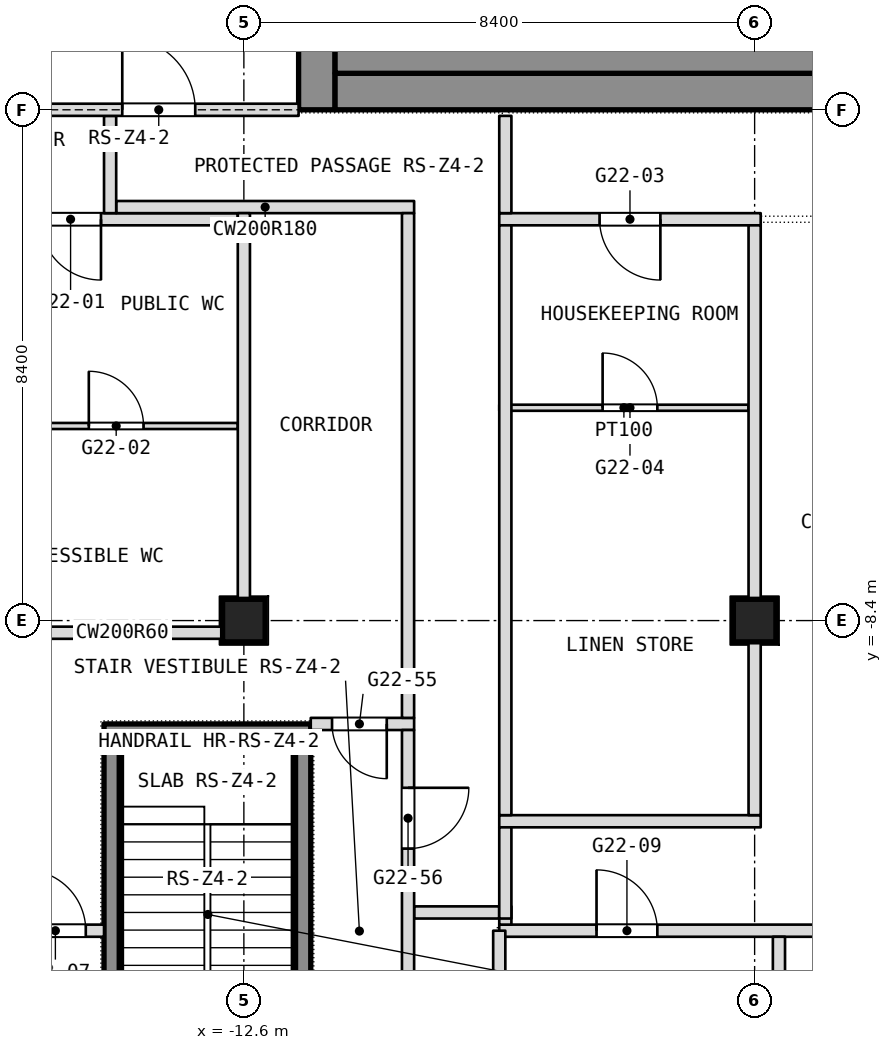
"""IFC4 building model, lengths in metres.
Left out: names, types, materials, properties, quantities, classifications, styles, units other than length and angle.
Written with IfcOpenShell. Run it as: python <this file> out.ifc"""

import sys

from ifc_helpers import new_model, si_unit, direction, frame, frame_2d, origin, origin_2d, place, context, subcontext, project, spatial, rectangle, extrude, element, fill, save


model = new_model("IFC4")
c1 = context("Model", 3, precision=1e-05, world=origin(), true_north=direction((0.0, 1.0)))
c2 = subcontext(c1, "Body", "Model", "MODEL_VIEW")
j1 = project(units=[si_unit("LENGTHUNIT", "METRE"), si_unit("PLANEANGLEUNIT", "RADIAN")], contexts=[c1])
p1 = place(None, origin())
s1 = spatial("IfcSite", under=j1, at=p1, CompositionType="ELEMENT")
p2 = place(p1, origin())
s2 = spatial("IfcBuilding", under=s1, at=p2, CompositionType="ELEMENT")
p3 = place(p2, frame((0.0, 0.0, 266.9)))
s3 = spatial("IfcBuildingStorey", under=s2, at=p3, CompositionType="ELEMENT", Elevation=266.9)
p4 = place(p3, frame((-11.4, 0.0, 0.0), z_axis=(0.0, 0.0, 1.0), x_axis=(0.0, 1.0, 0.0)))
e1 = element("IfcWall", 1, at=p4, inside=s3, PredefinedType="SHEAR", context=c2, shape_type="SweptSolid", body=[
    extrude(rectangle(XDim=16.8, YDim=0.6, at=frame_2d((8.4, 0.0))), origin(), (0.0, 0.0, 1.0), 3.6),
])
p5 = place(p4, frame((3.6, 0.0, 0.0)))
e2 = element("IfcOpeningElement", 2, at=p5, cuts=e1, PredefinedType="OPENING", context=c2, shape_type="SweptSolid", body=[
    extrude(rectangle(XDim=0.9, YDim=2.1, at=frame_2d((0.45, 1.05))), frame((0.0, 0.3, 0.0), z_axis=(0.0, -1.0, 0.0), x_axis=(1.0, 0.0, 0.0)), (0.0, 0.0, 1.0), 0.6),
])
p6 = place(p4, frame((6.825, 0.0, 0.0)))
e3 = element("IfcOpeningElement", 3, at=p6, cuts=e1, PredefinedType="OPENING", context=c2, shape_type="SweptSolid", body=[
    extrude(rectangle(XDim=1.2, YDim=2.1, at=frame_2d((0.6, 1.05))), frame((0.0, 0.3, 0.0), z_axis=(0.0, -1.0, 0.0), x_axis=(1.0, 0.0, 0.0)), (0.0, 0.0, 1.0), 0.6),
])
p7 = place(p4, frame((12.3, 0.0, 0.0)))
e4 = element("IfcOpeningElement", 4, at=p7, cuts=e1, PredefinedType="OPENING", context=c2, shape_type="SweptSolid", body=[
    extrude(rectangle(XDim=0.9, YDim=2.1, at=frame_2d((0.45, 1.05))), frame((0.0, 0.3, 0.0), z_axis=(0.0, -1.0, 0.0), x_axis=(1.0, 0.0, 0.0)), (0.0, 0.0, 1.0), 0.6),
])
p8 = place(p4, frame((8.775, 0.0, 0.0)))
e5 = element("IfcOpeningElement", 5, at=p8, cuts=e1, PredefinedType="OPENING", context=c2, shape_type="SweptSolid", body=[
    extrude(rectangle(XDim=1.2, YDim=2.1, at=frame_2d((0.6, 1.05))), frame((0.0, 0.3, 0.0), z_axis=(0.0, -1.0, 0.0), x_axis=(1.0, 0.0, 0.0)), (0.0, 0.0, 1.0), 0.6),
])
p9 = place(p3, frame((-11.1, 0.3, 0.0), z_axis=(0.0, 0.0, 1.0), x_axis=(1.0, 0.0, 0.0)))
e6 = element("IfcWall", 6, at=p9, inside=s3, PredefinedType="SHEAR", context=c2, shape_type="SweptSolid", body=[
    extrude(rectangle(XDim=22.2, YDim=0.6, at=frame_2d((11.1, 0.0))), origin(), (0.0, 0.0, 1.0), 3.6),
])
p10 = place(p3, frame((-4.2, 0.6, 0.0), z_axis=(0.0, 0.0, 1.0), x_axis=(0.0, 1.0, 0.0)))
e7 = element("IfcWall", 7, at=p10, inside=s3, PredefinedType="SHEAR", context=c2, shape_type="SweptSolid", body=[
    extrude(rectangle(XDim=15.6, YDim=0.35, at=frame_2d((7.8, 0.0))), origin(), (0.0, 0.0, 1.0), 3.6),
])
p11 = place(p10, frame((8.7, 0.0, 0.0)))
e8 = element("IfcOpeningElement", 8, at=p11, cuts=e7, PredefinedType="OPENING", context=c2, shape_type="SweptSolid", body=[
    extrude(rectangle(XDim=1.2, YDim=2.1, at=frame_2d((0.6, 1.05))), frame((0.0, 0.175, 0.0), z_axis=(0.0, -1.0, 0.0), x_axis=(1.0, 0.0, 0.0)), (0.0, 0.0, 1.0), 0.35),
])
for number, where, z_axis, x_axis in (
    (9, (-12.6, -8.4, 0.0), (0.0, 0.0, 1.0), (1.0, 0.0, 0.0)),
    (10, (-4.2, -8.4, 0.0), (0.0, 0.0, 1.0), (1.0, 0.0, 0.0)),
):
    element("IfcColumn", number, at=place(p3, frame(where, z_axis=z_axis, x_axis=x_axis)), inside=s3, PredefinedType="COLUMN", context=c2, shape_type="SweptSolid", body=[
        extrude(rectangle(XDim=0.7, YDim=0.7, at=origin_2d()), origin(), (0.0, 0.0, 1.0), 3.6),
    ])
p12 = place(p3, frame((-16.7, -13.5, 0.0), z_axis=(0.0, 0.0, 1.0), x_axis=(1.0, 0.0, 0.0)))
e11 = element("IfcWall", 11, at=p12, inside=s3, PredefinedType="PARTITIONING", context=c2, shape_type="SweptSolid", body=[
    extrude(rectangle(XDim=1.8, YDim=0.2, at=frame_2d((0.9, 0.0))), origin(), (0.0, 0.0, 1.0), 3.34),
])
p13 = place(p12, frame((0.5, 0.0, 0.0)))
e12 = element("IfcOpeningElement", 12, at=p13, cuts=e11, PredefinedType="OPENING", context=c2, shape_type="SweptSolid", body=[
    extrude(rectangle(XDim=1.0, YDim=2.1, at=frame_2d((0.5, 1.05))), frame((0.0, 0.1, 0.0), z_axis=(0.0, -1.0, 0.0), x_axis=(1.0, 0.0, 0.0)), (0.0, 0.0, 1.0), 0.2),
])
p14 = place(p3, frame((-8.4, -13.5, 0.0), z_axis=(0.0, 0.0, 1.0), x_axis=(1.0, 0.0, 0.0)))
e13 = element("IfcWall", 13, at=p14, inside=s3, PredefinedType="PARTITIONING", context=c2, shape_type="SweptSolid", body=[
    extrude(rectangle(XDim=12.7, YDim=0.2, at=frame_2d((6.35, 0.0))), origin(), (0.0, 0.0, 1.0), 3.34),
])
p15 = place(p14, frame((1.6, 0.0, 0.0)))
e14 = element("IfcOpeningElement", 14, at=p15, cuts=e13, PredefinedType="OPENING", context=c2, shape_type="SweptSolid", body=[
    extrude(rectangle(XDim=1.0, YDim=2.1, at=frame_2d((0.5, 1.05))), frame((0.0, 0.1, 0.0), z_axis=(0.0, -1.0, 0.0), x_axis=(1.0, 0.0, 0.0)), (0.0, 0.0, 1.0), 0.2),
])
p16 = place(p14, frame((5.8, 0.0, 0.0)))
e15 = element("IfcOpeningElement", 15, at=p16, cuts=e13, PredefinedType="OPENING", context=c2, shape_type="SweptSolid", body=[
    extrude(rectangle(XDim=1.0, YDim=2.1, at=frame_2d((0.5, 1.05))), frame((0.0, 0.1, 0.0), z_axis=(0.0, -1.0, 0.0), x_axis=(1.0, 0.0, 0.0)), (0.0, 0.0, 1.0), 0.2),
])
p17 = place(p14, frame((10.0, 0.0, 0.0)))
e16 = element("IfcOpeningElement", 16, at=p17, cuts=e13, PredefinedType="OPENING", context=c2, shape_type="SweptSolid", body=[
    extrude(rectangle(XDim=1.0, YDim=2.1, at=frame_2d((0.5, 1.05))), frame((0.0, 0.1, 0.0), z_axis=(0.0, -1.0, 0.0), x_axis=(1.0, 0.0, 0.0)), (0.0, 0.0, 1.0), 0.2),
])
p18 = place(p3, frame((-9.8, -13.2, 0.0), z_axis=(0.0, 0.0, 1.0), x_axis=(1.0, 0.0, 0.0)))
e17 = element("IfcWall", 17, at=p18, inside=s3, PredefinedType="PARTITIONING", context=c2, shape_type="SweptSolid", body=[
    extrude(rectangle(XDim=1.4, YDim=0.2, at=frame_2d((0.7, 0.0))), origin(), (0.0, 0.0, 1.0), 3.34),
])
p19 = place(p3, frame((-8.4, -11.7, 0.0), z_axis=(0.0, 0.0, 1.0), x_axis=(1.0, 0.0, 0.0)))
e18 = element("IfcWall", 18, at=p19, inside=s3, PredefinedType="PARTITIONING", context=c2, shape_type="SweptSolid", body=[
    extrude(rectangle(XDim=4.3, YDim=0.2, at=frame_2d((2.15, 0.0))), origin(), (0.0, 0.0, 1.0), 3.34),
])
p20 = place(p3, frame((-11.5, -10.1, 0.0), z_axis=(0.0, 0.0, 1.0), x_axis=(1.0, 0.0, 0.0)))
e19 = element("IfcWall", 19, at=p20, inside=s3, PredefinedType="PARTITIONING", context=c2, shape_type="SweptSolid", body=[
    extrude(rectangle(XDim=1.7, YDim=0.2, at=frame_2d((0.85, 0.0))), origin(), (0.0, 0.0, 1.0), 3.34),
])
p21 = place(p20, frame((0.35, 0.0, 0.0)))
e20 = element("IfcOpeningElement", 20, at=p21, cuts=e19, PredefinedType="OPENING", context=c2, shape_type="SweptSolid", body=[
    extrude(rectangle(XDim=0.9, YDim=2.1, at=frame_2d((0.45, 1.05))), frame((0.0, 0.1, 0.0), z_axis=(0.0, -1.0, 0.0), x_axis=(1.0, 0.0, 0.0)), (0.0, 0.0, 1.0), 0.2),
])
p22 = place(p3, frame((-16.7, -8.6, 0.0), z_axis=(0.0, 0.0, 1.0), x_axis=(1.0, 0.0, 0.0)))
e21 = element("IfcWall", 21, at=p22, inside=s3, PredefinedType="PARTITIONING", context=c2, shape_type="SweptSolid", body=[
    extrude(rectangle(XDim=4.2, YDim=0.2, at=frame_2d((2.1, 0.0))), origin(), (0.0, 0.0, 1.0), 3.34),
])
p23 = place(p3, frame((-16.7, -5.2, 0.0), z_axis=(0.0, 0.0, 1.0), x_axis=(1.0, 0.0, 0.0)))
e22 = element("IfcWall", 22, at=p23, inside=s3, PredefinedType="PARTITIONING", context=c2, shape_type="SweptSolid", body=[
    extrude(rectangle(XDim=4.0, YDim=0.1, at=frame_2d((2.0, 0.0))), origin(), (0.0, 0.0, 1.0), 3.34),
])
p24 = place(p23, frame((1.55, 0.0, 0.0)))
e23 = element("IfcOpeningElement", 23, at=p24, cuts=e22, PredefinedType="OPENING", context=c2, shape_type="SweptSolid", body=[
    extrude(rectangle(XDim=0.9, YDim=2.1, at=frame_2d((0.45, 1.05))), frame((0.0, 0.05, 0.0), z_axis=(0.0, -1.0, 0.0), x_axis=(1.0, 0.0, 0.0)), (0.0, 0.0, 1.0), 0.1),
])
p25 = place(p3, frame((-8.4, -4.9, 0.0), z_axis=(0.0, 0.0, 1.0), x_axis=(1.0, 0.0, 0.0)))
e24 = element("IfcWall", 24, at=p25, inside=s3, PredefinedType="PARTITIONING", context=c2, shape_type="SweptSolid", body=[
    extrude(rectangle(XDim=4.1, YDim=0.1, at=frame_2d((2.05, 0.0))), origin(), (0.0, 0.0, 1.0), 3.34),
])
p26 = place(p25, frame((1.7, 0.0, 0.0)))
e25 = element("IfcOpeningElement", 25, at=p26, cuts=e24, PredefinedType="OPENING", context=c2, shape_type="SweptSolid", body=[
    extrude(rectangle(XDim=0.9, YDim=2.1, at=frame_2d((0.45, 1.05))), frame((0.0, 0.05, 0.0), z_axis=(0.0, -1.0, 0.0), x_axis=(1.0, 0.0, 0.0)), (0.0, 0.0, 1.0), 0.1),
])
p27 = place(p3, frame((-16.9, -1.8, 0.0), z_axis=(0.0, 0.0, 1.0), x_axis=(1.0, 0.0, 0.0)))
e26 = element("IfcWall", 26, at=p27, inside=s3, PredefinedType="PARTITIONING", context=c2, shape_type="SweptSolid", body=[
    extrude(rectangle(XDim=4.2, YDim=0.2, at=frame_2d((2.1, 0.0))), origin(), (0.0, 0.0, 1.0), 3.34),
])
p28 = place(p27, frame((0.95, 0.0, 0.0)))
e27 = element("IfcOpeningElement", 27, at=p28, cuts=e26, PredefinedType="OPENING", context=c2, shape_type="SweptSolid", body=[
    extrude(rectangle(XDim=1.0, YDim=2.1, at=frame_2d((0.5, 1.05))), frame((0.0, 0.1, 0.0), z_axis=(0.0, -1.0, 0.0), x_axis=(1.0, 0.0, 0.0)), (0.0, 0.0, 1.0), 0.2),
])
p29 = place(p3, frame((-8.4, -1.8, 0.0), z_axis=(0.0, 0.0, 1.0), x_axis=(1.0, 0.0, 0.0)))
e28 = element("IfcWall", 28, at=p29, inside=s3, PredefinedType="PARTITIONING", context=c2, shape_type="SweptSolid", body=[
    extrude(rectangle(XDim=4.3, YDim=0.2, at=frame_2d((2.15, 0.0))), origin(), (0.0, 0.0, 1.0), 3.34),
])
p30 = place(p29, frame((1.65, 0.0, 0.0)))
e29 = element("IfcOpeningElement", 29, at=p30, cuts=e28, PredefinedType="OPENING", context=c2, shape_type="SweptSolid", body=[
    extrude(rectangle(XDim=1.0, YDim=2.1, at=frame_2d((0.5, 1.05))), frame((0.0, 0.1, 0.0), z_axis=(0.0, -1.0, 0.0), x_axis=(1.0, 0.0, 0.0)), (0.0, 0.0, 1.0), 0.2),
])
p31 = place(p3, frame((-14.7, -1.6, 0.0), z_axis=(0.0, 0.0, 1.0), x_axis=(1.0, 0.0, 0.0)))
e30 = element("IfcWall", 30, at=p31, inside=s3, PredefinedType="PARTITIONING", context=c2, shape_type="SweptSolid", body=[
    extrude(rectangle(XDim=4.9, YDim=0.2, at=frame_2d((2.45, 0.0))), origin(), (0.0, 0.0, 1.0), 3.34),
])
p32 = place(p3, frame((-3.8, -20.0, 0.0), z_axis=(0.0, 0.0, 1.0), x_axis=(0.0, 1.0, 0.0)))
e31 = element("IfcWall", 31, at=p32, inside=s3, PredefinedType="PARTITIONING", context=c2, shape_type="SweptSolid", body=[
    extrude(rectangle(XDim=6.4, YDim=0.2, at=frame_2d((3.2, 0.0))), origin(), (0.0, 0.0, 1.0), 3.34),
])
p33 = place(p3, frame((-4.2, -11.6, 0.0), z_axis=(0.0, 0.0, 1.0), x_axis=(0.0, 1.0, 0.0)))
e32 = element("IfcWall", 32, at=p33, inside=s3, PredefinedType="PARTITIONING", context=c2, shape_type="SweptSolid", body=[
    extrude(rectangle(XDim=9.7, YDim=0.2, at=frame_2d((4.85, 0.0))), origin(), (0.0, 0.0, 1.0), 3.34),
])
p34 = place(p3, frame((-8.3, -13.4, 0.0), z_axis=(0.0, 0.0, 1.0), x_axis=(0.0, 1.0, 0.0)))
e33 = element("IfcWall", 33, at=p34, inside=s3, PredefinedType="PARTITIONING", context=c2, shape_type="SweptSolid", body=[
    extrude(rectangle(XDim=0.3, YDim=0.2, at=frame_2d((0.15, 0.0))), origin(), (0.0, 0.0, 1.0), 3.34),
])
p35 = place(p3, frame((-8.3, -13.3, 0.0), z_axis=(0.0, 0.0, 1.0), x_axis=(0.0, 1.0, 0.0)))
e34 = element("IfcWall", 34, at=p35, inside=s3, PredefinedType="PARTITIONING", context=c2, shape_type="SweptSolid", body=[
    extrude(rectangle(XDim=1.5, YDim=0.2, at=frame_2d((0.75, 0.0))), origin(), (0.0, 0.0, 1.0), 3.34),
])
p36 = place(p3, frame((-8.3, -1.7, 0.0), z_axis=(0.0, 0.0, 1.0), x_axis=(0.0, 1.0, 0.0)))
e35 = element("IfcWall", 35, at=p36, inside=s3, PredefinedType="PARTITIONING", context=c2, shape_type="SweptSolid", body=[
    extrude(rectangle(XDim=1.6, YDim=0.2, at=frame_2d((0.8, 0.0))), origin(), (0.0, 0.0, 1.0), 3.34),
])
p37 = place(p3, frame((-8.3, -11.6, 0.0), z_axis=(0.0, 0.0, 1.0), x_axis=(0.0, 1.0, 0.0)))
e36 = element("IfcWall", 36, at=p37, inside=s3, PredefinedType="PARTITIONING", context=c2, shape_type="SweptSolid", body=[
    extrude(rectangle(XDim=9.7, YDim=0.2, at=frame_2d((4.85, 0.0))), origin(), (0.0, 0.0, 1.0), 3.34),
])
p38 = place(p3, frame((-8.4, -20.0, 0.0), z_axis=(0.0, 0.0, 1.0), x_axis=(0.0, 1.0, 0.0)))
e37 = element("IfcWall", 37, at=p38, inside=s3, PredefinedType="PARTITIONING", context=c2, shape_type="SweptSolid", body=[
    extrude(rectangle(XDim=6.5, YDim=0.2, at=frame_2d((3.25, 0.0))), origin(), (0.0, 0.0, 1.0), 3.34),
])
p39 = place(p3, frame((-9.9, -16.4, 0.0), z_axis=(0.0, 0.0, 1.0), x_axis=(0.0, 1.0, 0.0)))
e38 = element("IfcWall", 38, at=p39, inside=s3, PredefinedType="PARTITIONING", context=c2, shape_type="SweptSolid", body=[
    extrude(rectangle(XDim=6.2, YDim=0.2, at=frame_2d((3.1, 0.0))), origin(), (0.0, 0.0, 1.0), 3.34),
])
p40 = place(p39, frame((4.25, 0.0, 0.0)))
e39 = element("IfcOpeningElement", 39, at=p40, cuts=e38, PredefinedType="OPENING", context=c2, shape_type="SweptSolid", body=[
    extrude(rectangle(XDim=1.0, YDim=2.1, at=frame_2d((0.5, 1.05))), frame((0.0, 0.1, 0.0), z_axis=(0.0, -1.0, 0.0), x_axis=(1.0, 0.0, 0.0)), (0.0, 0.0, 1.0), 0.2),
])
p41 = place(p3, frame((-9.9, -10.0, 0.0), z_axis=(0.0, 0.0, 1.0), x_axis=(0.0, 1.0, 0.0)))
e40 = element("IfcWall", 40, at=p41, inside=s3, PredefinedType="PARTITIONING", context=c2, shape_type="SweptSolid", body=[
    extrude(rectangle(XDim=8.3, YDim=0.2, at=frame_2d((4.15, 0.0))), origin(), (0.0, 0.0, 1.0), 3.34),
])
p42 = place(p3, frame((-12.6, -8.5, 0.0), z_axis=(0.0, 0.0, 1.0), x_axis=(0.0, 1.0, 0.0)))
e41 = element("IfcWall", 41, at=p42, inside=s3, PredefinedType="PARTITIONING", context=c2, shape_type="SweptSolid", body=[
    extrude(rectangle(XDim=6.8, YDim=0.2, at=frame_2d((3.4, 0.0))), origin(), (0.0, 0.0, 1.0), 3.34),
])
p43 = place(p3, frame((-14.8, -1.7, 0.0), z_axis=(0.0, 0.0, 1.0), x_axis=(0.0, 1.0, 0.0)))
e42 = element("IfcWall", 42, at=p43, inside=s3, PredefinedType="PARTITIONING", context=c2, shape_type="SweptSolid", body=[
    extrude(rectangle(XDim=1.6, YDim=0.2, at=frame_2d((0.8, 0.0))), origin(), (0.0, 0.0, 1.0), 3.34),
])
p44 = place(p3, frame((-11.1, 1.05, 0.0), z_axis=(0.0, 0.0, 1.0), x_axis=(1.0, 0.0, 0.0)))
e43 = element("IfcWall", 43, at=p44, inside=s3, PredefinedType="PARTITIONING", context=c2, shape_type="SweptSolid", body=[
    extrude(rectangle(XDim=22.2, YDim=0.9, at=frame_2d((11.1, 0.0))), origin(), (0.0, 0.0, 1.0), 3.34),
])
p45 = place(p3, frame((-16.7, 0.0, 0.0), z_axis=(0.0, 0.0, 1.0), x_axis=(1.0, 0.0, 0.0)))
e44 = element("IfcWall", 44, at=p45, inside=s3, PredefinedType="PARTITIONING", context=c2, shape_type="SweptSolid", body=[
    extrude(rectangle(XDim=5.0, YDim=0.2, at=frame_2d((2.5, 0.0))), origin(), (0.0, 0.0, 1.0), 3.0),
])
p46 = place(p45, frame((2.1, 0.0, 0.0)))
e45 = element("IfcOpeningElement", 45, at=p46, cuts=e44, PredefinedType="OPENING", context=c2, shape_type="SweptSolid", body=[
    extrude(rectangle(XDim=1.2, YDim=2.1, at=frame_2d((0.6, 1.05))), frame((0.0, 0.1, 0.0), z_axis=(0.0, -1.0, 0.0), x_axis=(1.0, 0.0, 0.0)), (0.0, 0.0, 1.0), 0.2),
])
p47 = place(p3, frame((-14.9, -10.225, -0.26), z_axis=(0.0, 0.0, 1.0), x_axis=(1.0, 0.0, 0.0)))
e46 = element("IfcWall", 46, at=p47, inside=s3, PredefinedType="SHEAR", context=c2, shape_type="SweptSolid", body=[
    extrude(rectangle(XDim=3.4, YDim=0.25, at=frame_2d((1.7, 0.0))), origin(), (0.0, 0.0, 1.0), 3.96),
])
p48 = place(p3, frame((-14.775, -16.05, -0.26), z_axis=(0.0, 0.0, 1.0), x_axis=(0.0, 1.0, 0.0)))
e47 = element("IfcWall", 47, at=p48, inside=s3, PredefinedType="SHEAR", context=c2, shape_type="SweptSolid", body=[
    extrude(rectangle(XDim=5.7, YDim=0.25, at=frame_2d((2.85, 0.0))), origin(), (0.0, 0.0, 1.0), 3.96),
])
p49 = place(p3, frame((-11.625, -16.05, -0.26), z_axis=(0.0, 0.0, 1.0), x_axis=(0.0, 1.0, 0.0)))
e48 = element("IfcWall", 48, at=p49, inside=s3, PredefinedType="SHEAR", context=c2, shape_type="SweptSolid", body=[
    extrude(rectangle(XDim=5.7, YDim=0.25, at=frame_2d((2.85, 0.0))), origin(), (0.0, 0.0, 1.0), 3.96),
])
p50 = place(p49, frame((0.2, 0.0, 0.0)))
e49 = element("IfcOpeningElement", 49, at=p50, cuts=e48, PredefinedType="OPENING", context=c2, shape_type="SweptSolid", body=[
    extrude(rectangle(XDim=1.0, YDim=2.1, at=frame_2d((0.5, 1.05))), frame((0.0, 0.125, 0.0), z_axis=(0.0, -1.0, 0.0), x_axis=(1.0, 0.0, 0.0)), (0.0, 0.0, 1.0), 0.25),
])
p51 = place(p13, origin())
e50 = element("IfcDoor", 50, at=p51, inside=s3, OperationType="SINGLE_SWING_RIGHT", PredefinedType="DOOR", context=c2, shape_type="SweptSolid", body=[
    extrude(rectangle(XDim=1.0, YDim=2.1, at=frame_2d((0.5, 1.05))), frame((0.0, 0.025, 0.0), z_axis=(0.0, -1.0, 0.0), x_axis=(1.0, 0.0, 0.0)), (0.0, 0.0, 1.0), 0.05),
])
fill(e12, e50)
p52 = place(p15, origin())
e51 = element("IfcDoor", 51, at=p52, inside=s3, OperationType="SINGLE_SWING_LEFT", PredefinedType="DOOR", context=c2, shape_type="SweptSolid", body=[
    extrude(rectangle(XDim=1.0, YDim=2.1, at=frame_2d((0.5, 1.05))), frame((0.0, 0.025, 0.0), z_axis=(0.0, -1.0, 0.0), x_axis=(1.0, 0.0, 0.0)), (0.0, 0.0, 1.0), 0.05),
])
fill(e14, e51)
p53 = place(p21, origin())
e52 = element("IfcDoor", 52, at=p53, inside=s3, OperationType="SINGLE_SWING_LEFT", PredefinedType="DOOR", context=c2, shape_type="SweptSolid", body=[
    extrude(rectangle(XDim=0.9, YDim=2.1, at=frame_2d((0.45, 1.05))), frame((0.0, 0.025, 0.0), z_axis=(0.0, -1.0, 0.0), x_axis=(1.0, 0.0, 0.0)), (0.0, 0.0, 1.0), 0.05),
])
fill(e20, e52)
p54 = place(p24, origin())
e53 = element("IfcDoor", 53, at=p54, inside=s3, OperationType="SINGLE_SWING_RIGHT", PredefinedType="DOOR", context=c2, shape_type="SweptSolid", body=[
    extrude(rectangle(XDim=0.9, YDim=2.1, at=frame_2d((0.45, 1.05))), frame((0.0, 0.025, 0.0), z_axis=(0.0, -1.0, 0.0), x_axis=(1.0, 0.0, 0.0)), (0.0, 0.0, 1.0), 0.05),
])
fill(e23, e53)
p55 = place(p26, origin())
e54 = element("IfcDoor", 54, at=p55, inside=s3, OperationType="SINGLE_SWING_RIGHT", PredefinedType="DOOR", context=c2, shape_type="SweptSolid", body=[
    extrude(rectangle(XDim=0.9, YDim=2.1, at=frame_2d((0.45, 1.05))), frame((0.0, 0.025, 0.0), z_axis=(0.0, -1.0, 0.0), x_axis=(1.0, 0.0, 0.0)), (0.0, 0.0, 1.0), 0.05),
])
fill(e25, e54)
p56 = place(p28, origin())
e55 = element("IfcDoor", 55, at=p56, inside=s3, OperationType="SINGLE_SWING_LEFT", PredefinedType="DOOR", context=c2, shape_type="SweptSolid", body=[
    extrude(rectangle(XDim=1.0, YDim=2.1, at=frame_2d((0.5, 1.05))), frame((0.0, 0.025, 0.0), z_axis=(0.0, -1.0, 0.0), x_axis=(1.0, 0.0, 0.0)), (0.0, 0.0, 1.0), 0.05),
])
fill(e27, e55)
p57 = place(p30, origin())
e56 = element("IfcDoor", 56, at=p57, inside=s3, OperationType="SINGLE_SWING_LEFT", PredefinedType="DOOR", context=c2, shape_type="SweptSolid", body=[
    extrude(rectangle(XDim=1.0, YDim=2.1, at=frame_2d((0.5, 1.05))), frame((0.0, 0.025, 0.0), z_axis=(0.0, -1.0, 0.0), x_axis=(1.0, 0.0, 0.0)), (0.0, 0.0, 1.0), 0.05),
])
fill(e29, e56)
p58 = place(p40, origin())
e57 = element("IfcDoor", 57, at=p58, inside=s3, OperationType="SINGLE_SWING_RIGHT", PredefinedType="DOOR", context=c2, shape_type="SweptSolid", body=[
    extrude(rectangle(XDim=1.0, YDim=2.1, at=frame_2d((0.5, 1.05))), frame((0.0, 0.025, 0.0), z_axis=(0.0, -1.0, 0.0), x_axis=(1.0, 0.0, 0.0)), (0.0, 0.0, 1.0), 0.05),
])
fill(e39, e57)
p59 = place(p46, origin())
e58 = element("IfcDoor", 58, at=p59, inside=s3, OperationType="SINGLE_SWING_LEFT", PredefinedType="DOOR", context=c2, shape_type="SweptSolid", body=[
    extrude(rectangle(XDim=1.2, YDim=2.1, at=frame_2d((0.6, 1.05))), frame((0.0, 0.025, 0.0), z_axis=(0.0, -1.0, 0.0), x_axis=(1.0, 0.0, 0.0)), (0.0, 0.0, 1.0), 0.05),
])
fill(e45, e58)
save(model, sys.argv[1])
